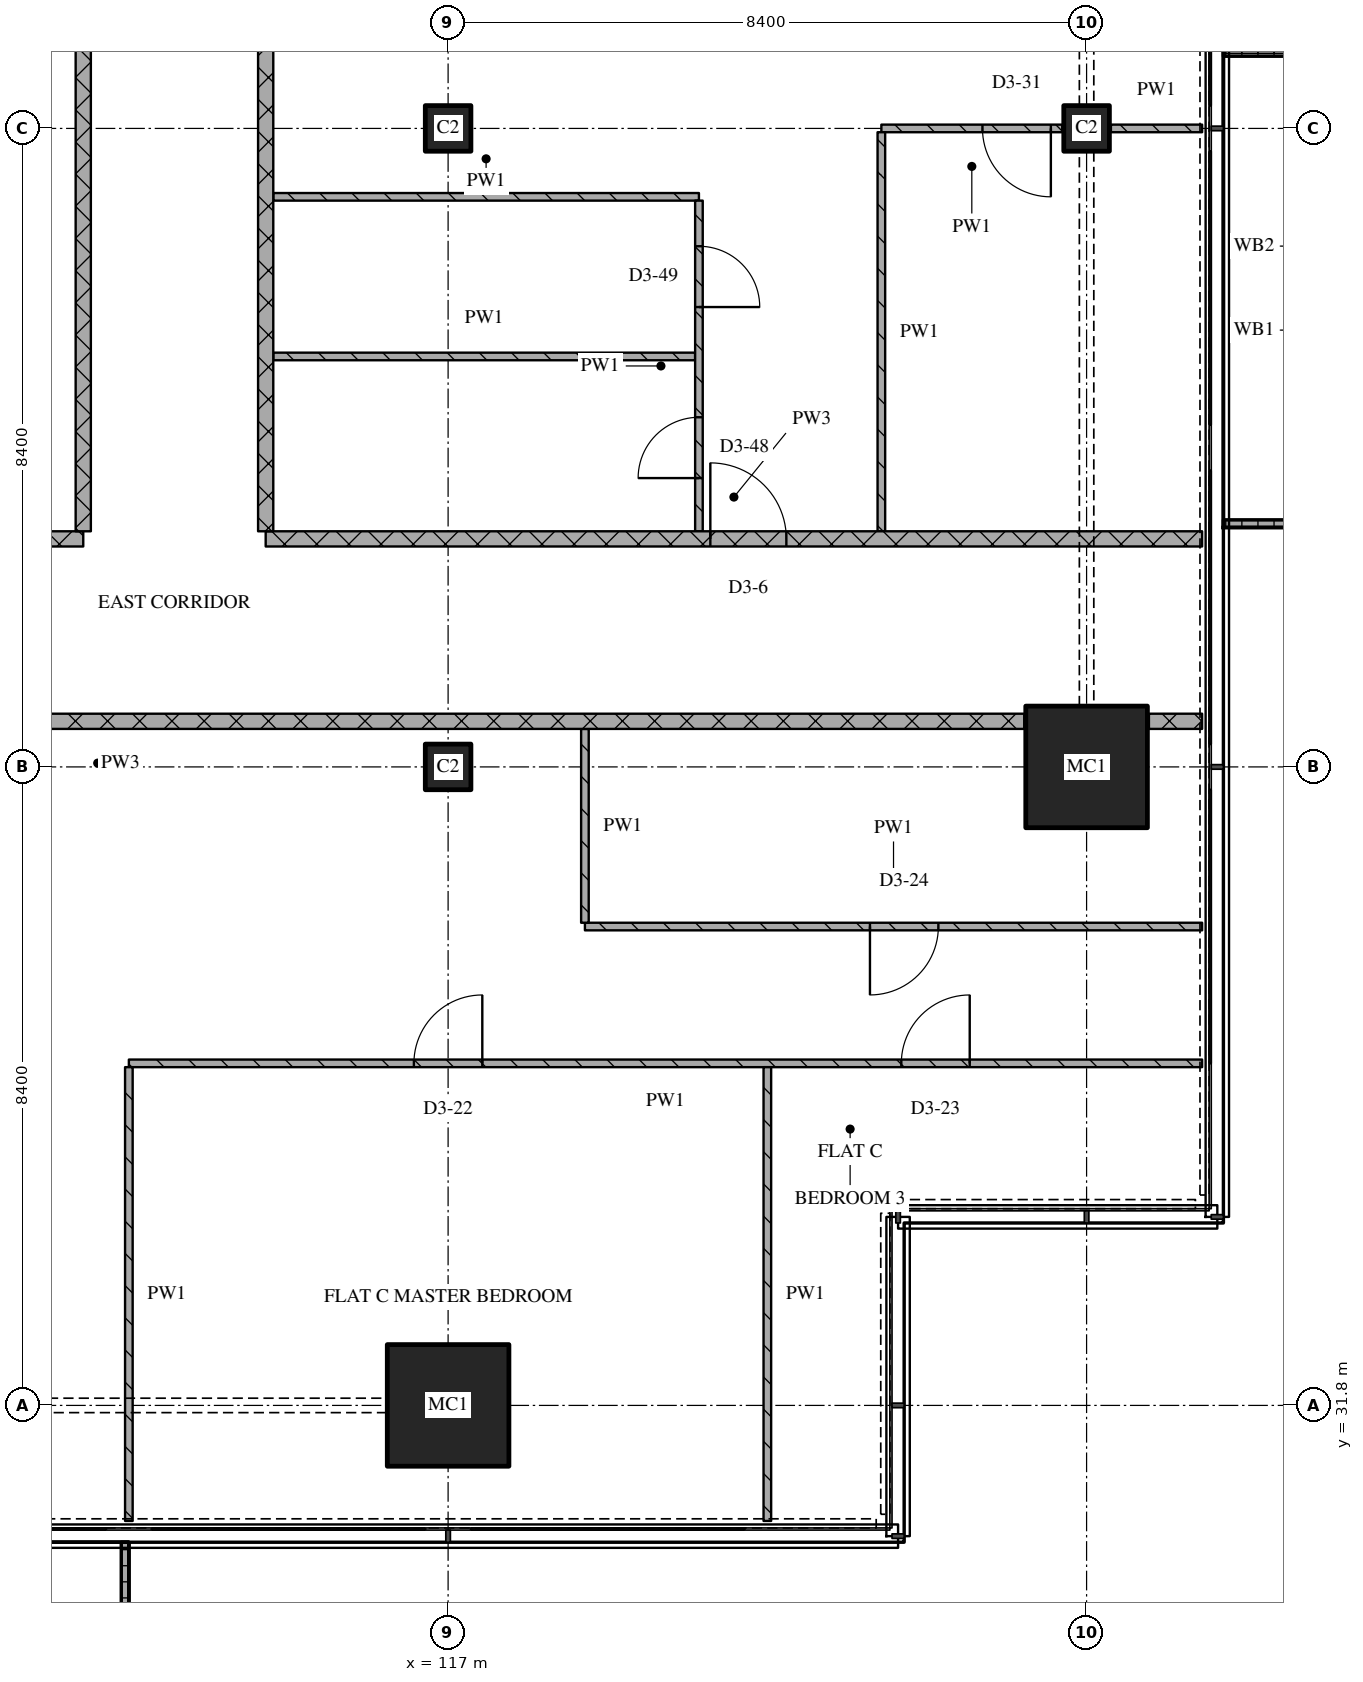
"""IFC4 building model, lengths in metres.
Left out: names, types, materials, properties, quantities, classifications, styles, units other than length and angle.
Written with IfcOpenShell. Run it as: python <this file> out.ifc"""

import sys

from ifc_helpers import new_model, si_unit, direction, frame, frame_2d, origin, origin_2d, place, context, subcontext, project, spatial, polyline, rectangle, outline, extrude, element, fill, save


model = new_model("IFC4")
c1 = context("Model", 3, precision=1e-05, world=origin(), true_north=direction((0.0, 1.0)))
c2 = subcontext(c1, "Body", "Model", "MODEL_VIEW")
j1 = project(units=[si_unit("LENGTHUNIT", "METRE"), si_unit("PLANEANGLEUNIT", "RADIAN")], contexts=[c1])
p1 = place(None, origin())
s1 = spatial("IfcSite", under=j1, at=p1, CompositionType="ELEMENT")
p2 = place(p1, origin())
s2 = spatial("IfcBuilding", under=s1, at=p2, CompositionType="ELEMENT")
p3 = place(p2, frame((0.0, 0.0, 230.7)))
s3 = spatial("IfcBuildingStorey", under=s2, at=p3, CompositionType="ELEMENT", Elevation=230.7)
p4 = place(p3, frame((117.0, 31.8, 0.0), z_axis=(0.0, 0.0, 1.0), x_axis=(1.0, 0.0, 0.0)))
e1 = element("IfcColumn", 1, at=p4, inside=s3, PredefinedType="COLUMN", context=c2, shape_type="SweptSolid", body=[
    extrude(rectangle(XDim=1.6, YDim=1.6, at=origin_2d()), origin(), (0.0, 0.0, 1.0), 3.6),
])
for number, where, z_axis, x_axis in (
    (2, (117.0, 40.2, 0.0), (0.0, 0.0, 1.0), (1.0, 0.0, 0.0)),
    (3, (117.0, 48.6, 0.0), (0.0, 0.0, 1.0), (1.0, 0.0, 0.0)),
):
    element("IfcColumn", number, at=place(p3, frame(where, z_axis=z_axis, x_axis=x_axis)), inside=s3, PredefinedType="COLUMN", context=c2, shape_type="SweptSolid", body=[
        extrude(rectangle(XDim=0.6, YDim=0.6, at=origin_2d()), origin(), (0.0, 0.0, 1.0), 3.6),
    ])
p5 = place(p3, frame((125.4, 40.2, 0.0), z_axis=(0.0, 0.0, 1.0), x_axis=(1.0, 0.0, 0.0)))
e4 = element("IfcColumn", 4, at=p5, inside=s3, PredefinedType="COLUMN", context=c2, shape_type="SweptSolid", body=[
    extrude(rectangle(XDim=1.6, YDim=1.6, at=origin_2d()), origin(), (0.0, 0.0, 1.0), 3.6),
])
p6 = place(p3, frame((125.4, 48.6, 0.0), z_axis=(0.0, 0.0, 1.0), x_axis=(1.0, 0.0, 0.0)))
e5 = element("IfcColumn", 5, at=p6, inside=s3, PredefinedType="COLUMN", context=c2, shape_type="SweptSolid", body=[
    extrude(rectangle(XDim=0.6, YDim=0.6, at=origin_2d()), origin(), (0.0, 0.0, 1.0), 3.6),
])
p7 = place(p3, origin())
e6 = element("IfcWall", 6, at=p7, inside=s3, PredefinedType="SOLIDWALL", context=c2, shape_type="SweptSolid", body=[
    extrude(outline(polyline([(108.6, 30.0), (108.7, 30.0), (108.7, 28.367), (112.7, 28.367), (112.7, 30.0), (112.8, 30.0), (112.8, 28.267), (108.6, 28.267), (108.6, 30.0)])), origin(), (0.0, 0.0, 1.0), 1.0),
])
p8 = place(p3, origin())
e7 = element("IfcWall", 7, at=p8, inside=s3, PredefinedType="SOLIDWALL", context=c2, shape_type="SweptSolid", body=[
    extrude(outline(polyline([(127.2, 43.35), (127.2, 43.45), (128.967, 43.45), (128.967, 49.55), (127.2, 49.55), (127.2, 49.65), (129.067, 49.65), (129.067, 43.35), (127.2, 43.35)])), origin(), (0.0, 0.0, 1.0), 1.0),
])
p9 = place(p3, frame((126.92, 36.3, 0.0), z_axis=(0.0, 0.0, 1.0), x_axis=(-1.0, 0.0, 0.0)))
e8 = element("IfcWall", 8, at=p9, inside=s3, PredefinedType="PARTITIONING", context=c2, shape_type="SweptSolid", body=[
    extrude(rectangle(XDim=14.12, YDim=0.1, at=frame_2d((7.06, 0.0))), origin(), (0.0, 0.0, 1.0), 3.32),
])
p10 = place(p9, frame((3.058, 0.0, 0.0)))
e9 = element("IfcOpeningElement", 9, at=p10, cuts=e8, PredefinedType="OPENING", context=c2, shape_type="SweptSolid", body=[
    extrude(rectangle(XDim=0.9, YDim=2.1, at=frame_2d((0.45, 1.05))), frame((0.0, 0.06, 0.0), z_axis=(0.0, -1.0, 0.0), x_axis=(1.0, 0.0, 0.0)), (0.0, 0.0, 1.0), 0.12),
])
p11 = place(p9, frame((9.47, 0.0, 0.0)))
e10 = element("IfcOpeningElement", 10, at=p11, cuts=e8, PredefinedType="OPENING", context=c2, shape_type="SweptSolid", body=[
    extrude(rectangle(XDim=0.9, YDim=2.1, at=frame_2d((0.45, 1.05))), frame((0.0, 0.06, 0.0), z_axis=(0.0, -1.0, 0.0), x_axis=(1.0, 0.0, 0.0)), (0.0, 0.0, 1.0), 0.12),
])
p12 = place(p3, frame((118.8, 38.1, 0.0), z_axis=(0.0, 0.0, 1.0), x_axis=(1.0, 0.0, 0.0)))
e11 = element("IfcWall", 11, at=p12, inside=s3, PredefinedType="PARTITIONING", context=c2, shape_type="SweptSolid", body=[
    extrude(rectangle(XDim=8.12, YDim=0.1, at=frame_2d((4.06, 0.0))), origin(), (0.0, 0.0, 1.0), 3.32),
])
p13 = place(p12, frame((3.75, 0.0, 0.0)))
e12 = element("IfcOpeningElement", 12, at=p13, cuts=e11, PredefinedType="OPENING", context=c2, shape_type="SweptSolid", body=[
    extrude(rectangle(XDim=0.9, YDim=2.1, at=frame_2d((0.45, 1.05))), frame((0.0, 0.06, 0.0), z_axis=(0.0, -1.0, 0.0), x_axis=(1.0, 0.0, 0.0)), (0.0, 0.0, 1.0), 0.12),
])
p14 = place(p3, frame((124.58, 40.8, 0.0), z_axis=(0.0, 0.0, 1.0), x_axis=(-1.0, 0.0, 0.0)))
e13 = element("IfcWall", 13, at=p14, inside=s3, PredefinedType="PARTITIONING", context=c2, shape_type="SweptSolid", body=[
    extrude(rectangle(XDim=24.38, YDim=0.2, at=frame_2d((12.19, 0.0))), origin(), (0.0, 0.0, 1.0), 3.32),
])
p15 = place(p14, frame((13.53, 0.0, 0.0)))
e14 = element("IfcOpeningElement", 14, at=p15, cuts=e13, PredefinedType="OPENING", context=c2, shape_type="SweptSolid", body=[
    extrude(rectangle(XDim=1.0, YDim=2.1, at=frame_2d((0.5, 1.05))), frame((0.0, 0.11, 0.0), z_axis=(0.0, -1.0, 0.0), x_axis=(1.0, 0.0, 0.0)), (0.0, 0.0, 1.0), 0.22),
])
p16 = place(p3, frame((126.22, 40.8, 0.0), z_axis=(0.0, 0.0, 1.0), x_axis=(1.0, 0.0, 0.0)))
e15 = element("IfcWall", 15, at=p16, inside=s3, PredefinedType="PARTITIONING", context=c2, shape_type="SweptSolid", body=[
    extrude(rectangle(XDim=0.7, YDim=0.2, at=frame_2d((0.35, 0.0))), origin(), (0.0, 0.0, 1.0), 3.32),
])
p17 = place(p3, frame((107.0, 43.2, 0.0), z_axis=(0.0, 0.0, 1.0), x_axis=(1.0, 0.0, 0.0)))
e16 = element("IfcWall", 16, at=p17, inside=s3, PredefinedType="PARTITIONING", context=c2, shape_type="SweptSolid", body=[
    extrude(rectangle(XDim=5.2, YDim=0.2, at=frame_2d((2.6, 0.0))), origin(), (0.0, 0.0, 1.0), 3.32),
])
p18 = place(p17, frame((2.15, 0.0, 0.0)))
e17 = element("IfcOpeningElement", 17, at=p18, cuts=e16, PredefinedType="OPENING", context=c2, shape_type="SweptSolid", body=[
    extrude(rectangle(XDim=0.9, YDim=2.1, at=frame_2d((0.45, 1.05))), frame((0.0, 0.11, 0.0), z_axis=(0.0, -1.0, 0.0), x_axis=(1.0, 0.0, 0.0)), (0.0, 0.0, 1.0), 0.22),
])
p19 = place(p3, frame((114.6, 43.2, 0.0), z_axis=(0.0, 0.0, 1.0), x_axis=(1.0, 0.0, 0.0)))
e18 = element("IfcWall", 18, at=p19, inside=s3, PredefinedType="PARTITIONING", context=c2, shape_type="SweptSolid", body=[
    extrude(rectangle(XDim=12.32, YDim=0.2, at=frame_2d((6.16, 0.0))), origin(), (0.0, 0.0, 1.0), 3.32),
])
p20 = place(p19, frame((5.85, 0.0, 0.0)))
e19 = element("IfcOpeningElement", 19, at=p20, cuts=e18, PredefinedType="OPENING", context=c2, shape_type="SweptSolid", body=[
    extrude(rectangle(XDim=1.0, YDim=2.1, at=frame_2d((0.5, 1.05))), frame((0.0, 0.11, 0.0), z_axis=(0.0, -1.0, 0.0), x_axis=(1.0, 0.0, 0.0)), (0.0, 0.0, 1.0), 0.22),
])
p21 = place(p3, frame((114.7, 45.6, 0.0), z_axis=(0.0, 0.0, 1.0), x_axis=(1.0, 0.0, 0.0)))
e20 = element("IfcWall", 20, at=p21, inside=s3, PredefinedType="PARTITIONING", context=c2, shape_type="SweptSolid", body=[
    extrude(rectangle(XDim=5.55, YDim=0.1, at=frame_2d((2.775, 0.0))), origin(), (0.0, 0.0, 1.0), 3.32),
])
p22 = place(p3, frame((114.7, 47.7, 0.0), z_axis=(0.0, 0.0, 1.0), x_axis=(1.0, 0.0, 0.0)))
e21 = element("IfcWall", 21, at=p22, inside=s3, PredefinedType="PARTITIONING", context=c2, shape_type="SweptSolid", body=[
    extrude(rectangle(XDim=5.6, YDim=0.1, at=frame_2d((2.8, 0.0))), origin(), (0.0, 0.0, 1.0), 3.32),
])
p23 = place(p3, frame((125.08, 48.6, 0.0), z_axis=(0.0, 0.0, 1.0), x_axis=(-1.0, 0.0, 0.0)))
e22 = element("IfcWall", 22, at=p23, inside=s3, PredefinedType="PARTITIONING", context=c2, shape_type="SweptSolid", body=[
    extrude(rectangle(XDim=2.38, YDim=0.1, at=frame_2d((1.19, 0.0))), origin(), (0.0, 0.0, 1.0), 3.32),
])
p24 = place(p23, frame((0.15, 0.0, 0.0)))
e23 = element("IfcOpeningElement", 23, at=p24, cuts=e22, PredefinedType="OPENING", context=c2, shape_type="SweptSolid", body=[
    extrude(rectangle(XDim=0.9, YDim=2.1, at=frame_2d((0.45, 1.05))), frame((0.0, 0.06, 0.0), z_axis=(0.0, -1.0, 0.0), x_axis=(1.0, 0.0, 0.0)), (0.0, 0.0, 1.0), 0.12),
])
p25 = place(p3, frame((125.72, 48.6, 0.0), z_axis=(0.0, 0.0, 1.0), x_axis=(1.0, 0.0, 0.0)))
e24 = element("IfcWall", 24, at=p25, inside=s3, PredefinedType="PARTITIONING", context=c2, shape_type="SweptSolid", body=[
    extrude(rectangle(XDim=1.2, YDim=0.1, at=frame_2d((0.6, 0.0))), origin(), (0.0, 0.0, 1.0), 3.32),
])
p26 = place(p3, frame((112.2, 58.7, 0.0), z_axis=(0.0, 0.0, 1.0), x_axis=(0.0, -1.0, 0.0)))
e25 = element("IfcWall", 25, at=p26, inside=s3, PredefinedType="PARTITIONING", context=c2, shape_type="SweptSolid", body=[
    extrude(rectangle(XDim=15.4, YDim=0.2, at=frame_2d((7.7, 0.0))), origin(), (0.0, 0.0, 1.0), 3.32),
])
p27 = place(p3, frame((112.8, 36.25, 0.0), z_axis=(0.0, 0.0, 1.0), x_axis=(0.0, -1.0, 0.0)))
e26 = element("IfcWall", 26, at=p27, inside=s3, PredefinedType="PARTITIONING", context=c2, shape_type="SweptSolid", body=[
    extrude(rectangle(XDim=5.97, YDim=0.1, at=frame_2d((2.985, 0.0))), origin(), (0.0, 0.0, 1.0), 3.32),
])
p28 = place(p3, frame((114.6, 61.1, 0.0), z_axis=(0.0, 0.0, 1.0), x_axis=(0.0, -1.0, 0.0)))
e27 = element("IfcWall", 27, at=p28, inside=s3, PredefinedType="PARTITIONING", context=c2, shape_type="SweptSolid", body=[
    extrude(rectangle(XDim=17.8, YDim=0.2, at=frame_2d((8.9, 0.0))), origin(), (0.0, 0.0, 1.0), 3.32),
])
p29 = place(p3, frame((118.8, 40.7, 0.0), z_axis=(0.0, 0.0, 1.0), x_axis=(0.0, -1.0, 0.0)))
e28 = element("IfcWall", 28, at=p29, inside=s3, PredefinedType="PARTITIONING", context=c2, shape_type="SweptSolid", body=[
    extrude(rectangle(XDim=2.55, YDim=0.1, at=frame_2d((1.275, 0.0))), origin(), (0.0, 0.0, 1.0), 3.32),
])
p30 = place(p3, frame((120.3, 43.3, 0.0), z_axis=(0.0, 0.0, 1.0), x_axis=(0.0, 1.0, 0.0)))
e29 = element("IfcWall", 29, at=p30, inside=s3, PredefinedType="PARTITIONING", context=c2, shape_type="SweptSolid", body=[
    extrude(rectangle(XDim=4.35, YDim=0.1, at=frame_2d((2.175, 0.0))), origin(), (0.0, 0.0, 1.0), 3.32),
])
p31 = place(p30, frame((0.7, 0.0, 0.0)))
e30 = element("IfcOpeningElement", 30, at=p31, cuts=e29, PredefinedType="OPENING", context=c2, shape_type="SweptSolid", body=[
    extrude(rectangle(XDim=0.8, YDim=2.1, at=frame_2d((0.4, 1.05))), frame((0.0, 0.06, 0.0), z_axis=(0.0, -1.0, 0.0), x_axis=(1.0, 0.0, 0.0)), (0.0, 0.0, 1.0), 0.12),
])
p32 = place(p30, frame((2.95, 0.0, 0.0)))
e31 = element("IfcOpeningElement", 31, at=p32, cuts=e29, PredefinedType="OPENING", context=c2, shape_type="SweptSolid", body=[
    extrude(rectangle(XDim=0.8, YDim=2.1, at=frame_2d((0.4, 1.05))), frame((0.0, 0.06, 0.0), z_axis=(0.0, -1.0, 0.0), x_axis=(1.0, 0.0, 0.0)), (0.0, 0.0, 1.0), 0.12),
])
p33 = place(p3, frame((121.2, 36.25, 0.0), z_axis=(0.0, 0.0, 1.0), x_axis=(0.0, -1.0, 0.0)))
e32 = element("IfcWall", 32, at=p33, inside=s3, PredefinedType="PARTITIONING", context=c2, shape_type="SweptSolid", body=[
    extrude(rectangle(XDim=5.97, YDim=0.1, at=frame_2d((2.985, 0.0))), origin(), (0.0, 0.0, 1.0), 3.32),
])
p34 = place(p3, frame((122.7, 48.55, 0.0), z_axis=(0.0, 0.0, 1.0), x_axis=(0.0, -1.0, 0.0)))
e33 = element("IfcWall", 33, at=p34, inside=s3, PredefinedType="PARTITIONING", context=c2, shape_type="SweptSolid", body=[
    extrude(rectangle(XDim=5.25, YDim=0.1, at=frame_2d((2.625, 0.0))), origin(), (0.0, 0.0, 1.0), 3.32),
])
p35 = place(p10, origin())
e34 = element("IfcDoor", 34, at=p35, inside=s3, OperationType="SINGLE_SWING_RIGHT", PredefinedType="DOOR", context=c2, shape_type="SweptSolid", body=[
    extrude(rectangle(XDim=0.9, YDim=2.1, at=frame_2d((0.45, 1.05))), frame((0.0, 0.025, 0.0), z_axis=(0.0, -1.0, 0.0), x_axis=(1.0, 0.0, 0.0)), (0.0, 0.0, 1.0), 0.05),
])
fill(e9, e34)
p36 = place(p11, origin())
e35 = element("IfcDoor", 35, at=p36, inside=s3, OperationType="SINGLE_SWING_RIGHT", PredefinedType="DOOR", context=c2, shape_type="SweptSolid", body=[
    extrude(rectangle(XDim=0.9, YDim=2.1, at=frame_2d((0.45, 1.05))), frame((0.0, 0.025, 0.0), z_axis=(0.0, -1.0, 0.0), x_axis=(1.0, 0.0, 0.0)), (0.0, 0.0, 1.0), 0.05),
])
fill(e10, e35)
p37 = place(p13, origin())
e36 = element("IfcDoor", 36, at=p37, inside=s3, OperationType="SINGLE_SWING_RIGHT", PredefinedType="DOOR", context=c2, shape_type="SweptSolid", body=[
    extrude(rectangle(XDim=0.9, YDim=2.1, at=frame_2d((0.45, 1.05))), frame((0.0, 0.025, 0.0), z_axis=(0.0, -1.0, 0.0), x_axis=(1.0, 0.0, 0.0)), (0.0, 0.0, 1.0), 0.05),
])
fill(e12, e36)
p38 = place(p20, origin())
e37 = element("IfcDoor", 37, at=p38, inside=s3, OperationType="SINGLE_SWING_LEFT", PredefinedType="DOOR", context=c2, shape_type="SweptSolid", body=[
    extrude(rectangle(XDim=1.0, YDim=2.1, at=frame_2d((0.5, 1.05))), frame((0.0, 0.025, 0.0), z_axis=(0.0, -1.0, 0.0), x_axis=(1.0, 0.0, 0.0)), (0.0, 0.0, 1.0), 0.05),
])
fill(e19, e37)
p39 = place(p24, origin())
e38 = element("IfcDoor", 38, at=p39, inside=s3, OperationType="SINGLE_SWING_LEFT", PredefinedType="DOOR", context=c2, shape_type="SweptSolid", body=[
    extrude(rectangle(XDim=0.9, YDim=2.1, at=frame_2d((0.45, 1.05))), frame((0.0, 0.025, 0.0), z_axis=(0.0, -1.0, 0.0), x_axis=(1.0, 0.0, 0.0)), (0.0, 0.0, 1.0), 0.05),
])
fill(e23, e38)
p40 = place(p31, origin())
e39 = element("IfcDoor", 39, at=p40, inside=s3, OperationType="SINGLE_SWING_LEFT", PredefinedType="DOOR", context=c2, shape_type="SweptSolid", body=[
    extrude(rectangle(XDim=0.8, YDim=2.1, at=frame_2d((0.4, 1.05))), frame((0.0, 0.025, 0.0), z_axis=(0.0, -1.0, 0.0), x_axis=(1.0, 0.0, 0.0)), (0.0, 0.0, 1.0), 0.05),
])
fill(e30, e39)
p41 = place(p32, origin())
e40 = element("IfcDoor", 40, at=p41, inside=s3, OperationType="SINGLE_SWING_RIGHT", PredefinedType="DOOR", context=c2, shape_type="SweptSolid", body=[
    extrude(rectangle(XDim=0.8, YDim=2.1, at=frame_2d((0.4, 1.05))), frame((0.0, 0.025, 0.0), z_axis=(0.0, -1.0, 0.0), x_axis=(1.0, 0.0, 0.0)), (0.0, 0.0, 1.0), 0.05),
])
fill(e31, e40)
save(model, sys.argv[1])
